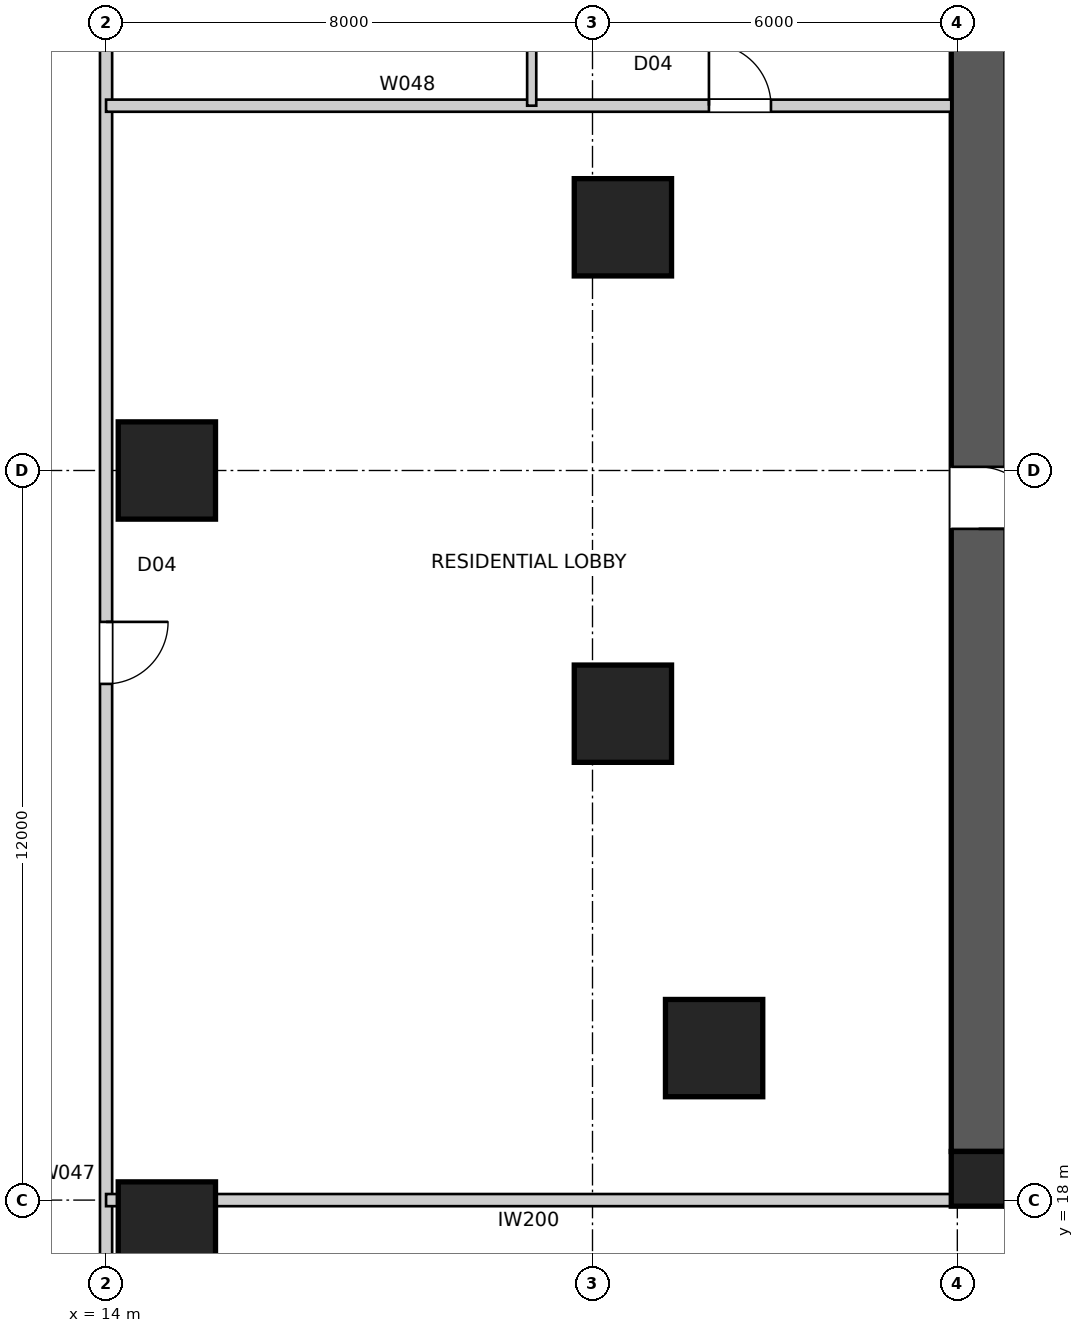
"""IFC4 building model, lengths in metres.
Left out: names, types, materials, properties, quantities, classifications, styles, units other than length and angle.
Written with IfcOpenShell. Run it as: python <this file> out.ifc"""

import sys

from ifc_helpers import new_model, si_unit, direction, frame, frame_2d, origin, origin_2d, place, context, subcontext, project, spatial, polyline, rectangle, outline, extrude, element, fill, save


model = new_model("IFC4")
c1 = context("Model", 3, precision=1e-05, world=origin(), true_north=direction((0.0, 1.0)))
c2 = subcontext(c1, "Body", "Model", "MODEL_VIEW")
j1 = project(units=[si_unit("LENGTHUNIT", "METRE"), si_unit("PLANEANGLEUNIT", "RADIAN")], contexts=[c1])
p1 = place(None, origin())
s1 = spatial("IfcSite", under=j1, at=p1, CompositionType="ELEMENT")
p2 = place(p1, origin())
s2 = spatial("IfcBuilding", under=s1, at=p2, CompositionType="ELEMENT")
p3 = place(p2, origin())
s3 = spatial("IfcBuildingStorey", under=s2, at=p3, CompositionType="ELEMENT", Elevation=0.0)
p4 = place(p3, frame((51.2, 18.35, 0.0), z_axis=(0.0, 0.0, 1.0), x_axis=(-1.0, 0.0, 0.0)))
e1 = element("IfcWall", 1, at=p4, inside=s3, PredefinedType="SHEAR", context=c2, shape_type="SweptSolid", body=[
    extrude(outline(polyline([(0.0, -0.45), (22.4, -0.45), (22.4, -0.025), (22.85, -0.025), (22.85, 0.025), (22.4, 0.025), (22.4, 0.45), (0.0, 0.45), (0.0, 0.025), (-0.45, 0.025), (-0.45, -0.025), (0.0, -0.025), (0.0, -0.45)])), origin(), (0.0, 0.0, 1.0), 6.0),
])
p5 = place(p3, frame((28.35, 41.2, 0.0), z_axis=(0.0, 0.0, 1.0), x_axis=(0.0, -1.0, 0.0)))
e2 = element("IfcWall", 2, at=p5, inside=s3, PredefinedType="SHEAR", context=c2, shape_type="SweptSolid", body=[
    extrude(outline(polyline([(0.0, -0.45), (22.4, -0.45), (22.4, -0.025), (22.85, -0.025), (22.85, 0.025), (22.4, 0.025), (22.4, 0.45), (0.0, 0.45), (0.0, 0.025), (-0.45, 0.025), (-0.45, -0.025), (0.0, -0.025), (0.0, -0.45)])), origin(), (0.0, 0.0, 1.0), 6.0),
])
p6 = place(p5, frame((11.14, 0.0, 0.0)))
e3 = element("IfcOpeningElement", 3, at=p6, cuts=e2, PredefinedType="OPENING", context=c2, shape_type="SweptSolid", body=[
    extrude(rectangle(XDim=1.02, YDim=2.4, at=frame_2d((0.51, 1.2))), frame((0.0, 0.46, 0.0), z_axis=(0.0, -1.0, 0.0), x_axis=(1.0, 0.0, 0.0)), (0.0, 0.0, 1.0), 0.92),
])
p7 = place(p3, frame((28.35, 18.35, 0.0), z_axis=(0.0, 0.0, 1.0), x_axis=(1.0, 0.0, 0.0)))
e4 = element("IfcColumn", 4, at=p7, inside=s3, PredefinedType="COLUMN", context=c2, shape_type="SweptSolid", body=[
    extrude(rectangle(XDim=0.9, YDim=0.9, at=origin_2d()), origin(), (0.0, 0.0, 1.0), 6.0),
])
for number, where, z_axis, x_axis in (
    (5, (15.0, 30.0, 0.0), (0.0, 0.0, 1.0), (1.0, 0.0, 0.0)),
    (6, (15.0, 17.5, 0.0), (0.0, 0.0, 1.0), (1.0, 0.0, 0.0)),
    (7, (22.5, 34.0, 0.0), (0.0, 0.0, 1.0), (1.0, 0.0, 0.0)),
    (8, (22.5, 26.0, 0.0), (0.0, 0.0, 1.0), (1.0, 0.0, 0.0)),
    (9, (24.0, 20.5, 0.0), (0.0, 0.0, 1.0), (1.0, 0.0, 0.0)),
):
    element("IfcColumn", number, at=place(p3, frame(where, z_axis=z_axis, x_axis=x_axis)), inside=s3, PredefinedType="COLUMN", context=c2, shape_type="SweptSolid", body=[
        extrude(rectangle(XDim=1.6, YDim=1.6, at=origin_2d()), origin(), (0.0, 0.0, 1.0), 6.0),
    ])
p8 = place(p3, frame((14.0, 57.0, 0.0), z_axis=(0.0, 0.0, 1.0), x_axis=(0.0, -1.0, 0.0)))
e10 = element("IfcWall", 10, at=p8, inside=s3, PredefinedType="PARTITIONING", context=c2, shape_type="SweptSolid", body=[
    extrude(rectangle(XDim=54.0, YDim=0.2, at=frame_2d((27.0, 0.0))), origin(), (0.0, 0.0, 1.0), 5.65),
])
p9 = place(p8, frame((29.49, 0.0, 0.0)))
e11 = element("IfcOpeningElement", 11, at=p9, cuts=e10, PredefinedType="OPENING", context=c2, shape_type="SweptSolid", body=[
    extrude(rectangle(XDim=1.02, YDim=2.4, at=frame_2d((0.51, 1.2))), frame((0.0, 0.11, 0.0), z_axis=(0.0, -1.0, 0.0), x_axis=(1.0, 0.0, 0.0)), (0.0, 0.0, 1.0), 0.22),
])
p10 = place(p8, frame((46.615, 0.0, 0.0)))
e12 = element("IfcOpeningElement", 12, at=p10, cuts=e10, PredefinedType="OPENING", context=c2, shape_type="SweptSolid", body=[
    extrude(rectangle(XDim=0.92, YDim=2.34, at=frame_2d((0.46, 1.17))), frame((0.0, 0.11, 0.0), z_axis=(0.0, -1.0, 0.0), x_axis=(1.0, 0.0, 0.0)), (0.0, 0.0, 1.0), 0.22),
])
p11 = place(p8, frame((6.465, 0.0, 0.0)))
e13 = element("IfcOpeningElement", 13, at=p11, cuts=e10, PredefinedType="OPENING", context=c2, shape_type="SweptSolid", body=[
    extrude(rectangle(XDim=0.92, YDim=2.34, at=frame_2d((0.46, 1.17))), frame((0.0, 0.11, 0.0), z_axis=(0.0, -1.0, 0.0), x_axis=(1.0, 0.0, 0.0)), (0.0, 0.0, 1.0), 0.22),
])
p12 = place(p8, frame((17.49, 0.0, 0.0)))
e14 = element("IfcOpeningElement", 14, at=p12, cuts=e10, PredefinedType="OPENING", context=c2, shape_type="SweptSolid", body=[
    extrude(rectangle(XDim=1.02, YDim=2.1, at=frame_2d((0.51, 1.05))), frame((0.0, 0.11, 0.0), z_axis=(0.0, -1.0, 0.0), x_axis=(1.0, 0.0, 0.0)), (0.0, 0.0, 1.0), 0.22),
])
p13 = place(p3, frame((14.0, 36.0, 0.0), z_axis=(0.0, 0.0, 1.0), x_axis=(1.0, 0.0, 0.0)))
e15 = element("IfcWall", 15, at=p13, inside=s3, PredefinedType="PARTITIONING", context=c2, shape_type="SweptSolid", body=[
    extrude(rectangle(XDim=13.9, YDim=0.2, at=frame_2d((6.95, 0.0))), origin(), (0.0, 0.0, 1.0), 5.65),
])
p14 = place(p13, frame((9.915, 0.0, 0.0)))
e16 = element("IfcOpeningElement", 16, at=p14, cuts=e15, PredefinedType="OPENING", context=c2, shape_type="SweptSolid", body=[
    extrude(rectangle(XDim=1.02, YDim=2.4, at=frame_2d((0.51, 1.2))), frame((0.0, 0.11, 0.0), z_axis=(0.0, -1.0, 0.0), x_axis=(1.0, 0.0, 0.0)), (0.0, 0.0, 1.0), 0.22),
])
p15 = place(p3, frame((27.9, 18.0, 0.0), z_axis=(0.0, 0.0, 1.0), x_axis=(-1.0, 0.0, 0.0)))
e17 = element("IfcWall", 17, at=p15, inside=s3, PredefinedType="PARTITIONING", context=c2, shape_type="SweptSolid", body=[
    extrude(rectangle(XDim=13.9, YDim=0.2, at=frame_2d((6.95, 0.0))), origin(), (0.0, 0.0, 1.0), 5.65),
])
p16 = place(p3, frame((21.0, 42.0, 0.0), z_axis=(0.0, 0.0, 1.0), x_axis=(0.0, -1.0, 0.0)))
e18 = element("IfcWall", 18, at=p16, inside=s3, PredefinedType="SOLIDWALL", context=c2, shape_type="SweptSolid", body=[
    extrude(rectangle(XDim=6.0, YDim=0.15, at=frame_2d((3.0, 0.0))), origin(), (0.0, 0.0, 1.0), 5.65),
])
p17 = place(p9, origin())
e19 = element("IfcDoor", 19, at=p17, inside=s3, OperationType="SINGLE_SWING_LEFT", PredefinedType="DOOR", context=c2, shape_type="SweptSolid", body=[
    extrude(rectangle(XDim=1.02, YDim=2.4, at=frame_2d((0.51, 1.2))), frame((0.0, 0.025, 0.0), z_axis=(0.0, -1.0, 0.0), x_axis=(1.0, 0.0, 0.0)), (0.0, 0.0, 1.0), 0.05),
])
fill(e11, e19)
p18 = place(p14, origin())
e20 = element("IfcDoor", 20, at=p18, inside=s3, OperationType="SINGLE_SWING_LEFT", PredefinedType="DOOR", context=c2, shape_type="SweptSolid", body=[
    extrude(rectangle(XDim=1.02, YDim=2.4, at=frame_2d((0.51, 1.2))), frame((0.0, 0.025, 0.0), z_axis=(0.0, -1.0, 0.0), x_axis=(1.0, 0.0, 0.0)), (0.0, 0.0, 1.0), 0.05),
])
fill(e16, e20)
p19 = place(p6, origin())
e21 = element("IfcDoor", 21, at=p19, inside=s3, OperationType="SINGLE_SWING_RIGHT", PredefinedType="DOOR", context=c2, shape_type="SweptSolid", body=[
    extrude(rectangle(XDim=1.02, YDim=2.4, at=frame_2d((0.51, 1.2))), frame((0.0, 0.025, 0.0), z_axis=(0.0, -1.0, 0.0), x_axis=(1.0, 0.0, 0.0)), (0.0, 0.0, 1.0), 0.05),
])
fill(e3, e21)
save(model, sys.argv[1])
